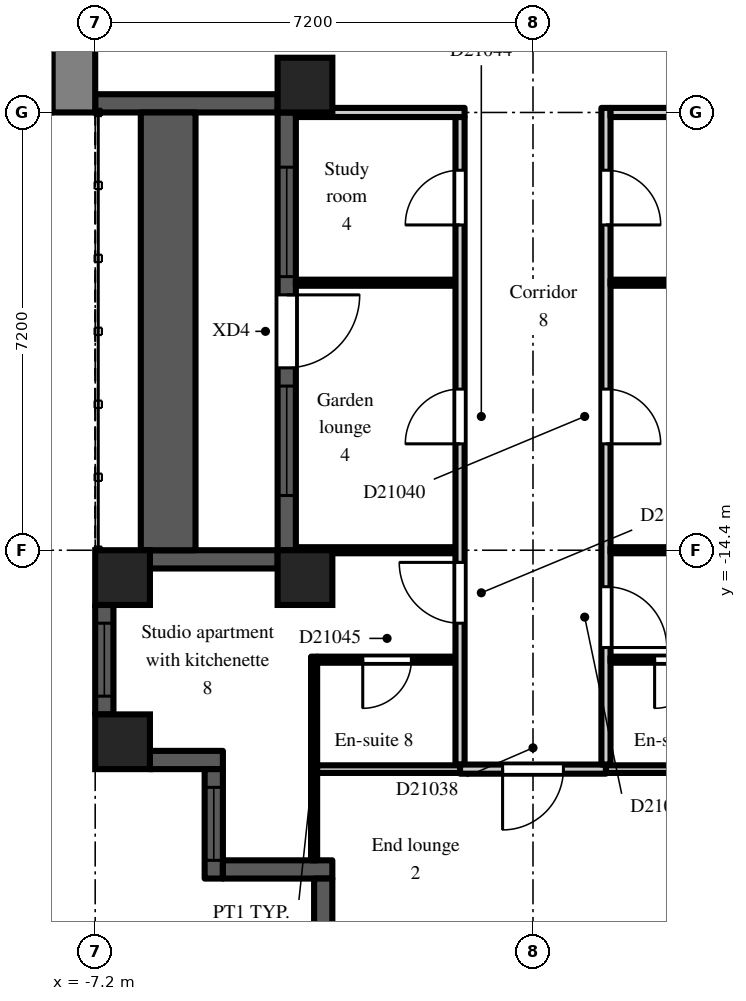
"""IFC4 building model, lengths in metres.
Left out: names, types, materials, properties, quantities, classifications, styles, units other than length and angle.
Written with IfcOpenShell. Run it as: python <this file> out.ifc"""

import sys

from ifc_helpers import new_model, si_unit, direction, frame, frame_2d, origin, origin_2d, place, context, subcontext, project, spatial, rectangle, extrude, element, fill, save


model = new_model("IFC4")
c1 = context("Model", 3, precision=1e-05, world=origin(), true_north=direction((0.0, 1.0)))
c2 = subcontext(c1, "Body", "Model", "MODEL_VIEW")
j1 = project(units=[si_unit("LENGTHUNIT", "METRE"), si_unit("PLANEANGLEUNIT", "RADIAN")], contexts=[c1])
p1 = place(None, origin())
s1 = spatial("IfcSite", under=j1, at=p1, CompositionType="ELEMENT")
p2 = place(p1, origin())
s2 = spatial("IfcBuilding", under=s1, at=p2, CompositionType="ELEMENT")
p3 = place(p2, frame((0.0, 0.0, 147.3)))
s3 = spatial("IfcBuildingStorey", under=s2, at=p3, CompositionType="ELEMENT", Elevation=147.3)
for number, where, z_axis, x_axis in (
    (1, (-6.75, -17.55, 0.0), (0.0, 0.0, 1.0), (1.0, 0.0, 0.0)),
    (2, (-6.75, -14.85, 0.0), (0.0, 0.0, 1.0), (1.0, 0.0, 0.0)),
    (3, (-3.75, -14.85, 0.0), (0.0, 0.0, 1.0), (1.0, 0.0, 0.0)),
    (4, (-3.75, -6.75, 0.0), (0.0, 0.0, 1.0), (1.0, 0.0, 0.0)),
):
    element("IfcColumn", number, at=place(p3, frame(where, z_axis=z_axis, x_axis=x_axis)), inside=s3, PredefinedType="COLUMN", context=c2, shape_type="SweptSolid", body=[
        extrude(rectangle(XDim=0.9, YDim=0.9, at=origin_2d()), origin(), (0.0, 0.0, 1.0), 3.0),
    ])
p4 = place(p3, frame((-7.2, -7.05, 0.0), z_axis=(0.0, 0.0, 1.0), x_axis=(1.0, 0.0, 0.0)))
e5 = element("IfcWall", 5, at=p4, inside=s3, PredefinedType="SOLIDWALL", context=c2, shape_type="SweptSolid", body=[
    extrude(rectangle(XDim=3.0, YDim=0.3, at=frame_2d((1.5, 0.0))), origin(), (0.0, 0.0, 1.0), 2.2),
])
p5 = place(p3, frame((-4.05, -7.2, 0.0), z_axis=(0.0, 0.0, 1.0), x_axis=(0.0, -1.0, 0.0)))
e6 = element("IfcWall", 6, at=p5, inside=s3, PredefinedType="SOLIDWALL", context=c2, shape_type="SweptSolid", body=[
    extrude(rectangle(XDim=7.2, YDim=0.3, at=frame_2d((3.6, 0.0))), origin(), (0.0, 0.0, 1.0), 2.2),
])
p6 = place(p5, frame((3.0, 0.0, 0.0)))
e7 = element("IfcOpeningElement", 7, at=p6, cuts=e6, PredefinedType="OPENING", context=c2, shape_type="SweptSolid", body=[
    extrude(rectangle(XDim=1.2, YDim=2.05, at=frame_2d((0.6, 1.025))), frame((0.0, 0.16, 0.0), z_axis=(0.0, -1.0, 0.0), x_axis=(1.0, 0.0, 0.0)), (0.0, 0.0, 1.0), 0.32),
])
p7 = place(p5, frame((0.9, 0.0, 0.2)))
e8 = element("IfcOpeningElement", 8, at=p7, cuts=e6, PredefinedType="OPENING", context=c2, shape_type="SweptSolid", body=[
    extrude(rectangle(XDim=1.8, YDim=1.85, at=frame_2d((0.9, 0.925))), frame((0.0, 0.16, 0.0), z_axis=(0.0, -1.0, 0.0), x_axis=(1.0, 0.0, 0.0)), (0.0, 0.0, 1.0), 0.32),
])
p8 = place(p5, frame((4.5, 0.0, 0.2)))
e9 = element("IfcOpeningElement", 9, at=p8, cuts=e6, PredefinedType="OPENING", context=c2, shape_type="SweptSolid", body=[
    extrude(rectangle(XDim=1.8, YDim=1.85, at=frame_2d((0.9, 0.925))), frame((0.0, 0.16, 0.0), z_axis=(0.0, -1.0, 0.0), x_axis=(1.0, 0.0, 0.0)), (0.0, 0.0, 1.0), 0.32),
])
p9 = place(p3, frame((-4.2, -14.55, 0.0), z_axis=(0.0, 0.0, 1.0), x_axis=(-1.0, 0.0, 0.0)))
e10 = element("IfcWall", 10, at=p9, inside=s3, PredefinedType="SOLIDWALL", context=c2, shape_type="SweptSolid", body=[
    extrude(rectangle(XDim=2.1, YDim=0.3, at=frame_2d((1.05, 0.0))), origin(), (0.0, 0.0, 1.0), 2.2),
])
p10 = place(p3, frame((-7.05, -15.3, 0.0), z_axis=(0.0, 0.0, 1.0), x_axis=(0.0, -1.0, 0.0)))
e11 = element("IfcWall", 11, at=p10, inside=s3, PredefinedType="SOLIDWALL", context=c2, shape_type="SweptSolid", body=[
    extrude(rectangle(XDim=1.8, YDim=0.3, at=frame_2d((0.9, 0.0))), origin(), (0.0, 0.0, 1.0), 2.2),
])
p11 = place(p10, frame((0.3, 0.0, 0.2)))
e12 = element("IfcOpeningElement", 12, at=p11, cuts=e11, PredefinedType="OPENING", context=c2, shape_type="SweptSolid", body=[
    extrude(rectangle(XDim=1.2, YDim=1.85, at=frame_2d((0.6, 0.925))), frame((0.0, 0.16, 0.0), z_axis=(0.0, -1.0, 0.0), x_axis=(1.0, 0.0, 0.0)), (0.0, 0.0, 1.0), 0.32),
])
p12 = place(p3, frame((-6.3, -17.85, 0.0), z_axis=(0.0, 0.0, 1.0), x_axis=(1.0, 0.0, 0.0)))
e13 = element("IfcWall", 13, at=p12, inside=s3, PredefinedType="SOLIDWALL", context=c2, shape_type="SweptSolid", body=[
    extrude(rectangle(XDim=1.2, YDim=0.3, at=frame_2d((0.6, 0.0))), origin(), (0.0, 0.0, 1.0), 2.6),
])
p13 = place(p3, frame((-5.25, -18.0, 0.0), z_axis=(0.0, 0.0, 1.0), x_axis=(0.0, -1.0, 0.0)))
e14 = element("IfcWall", 14, at=p13, inside=s3, PredefinedType="SOLIDWALL", context=c2, shape_type="SweptSolid", body=[
    extrude(rectangle(XDim=1.8, YDim=0.3, at=frame_2d((0.9, 0.0))), origin(), (0.0, 0.0, 1.0), 2.6),
])
p14 = place(p13, frame((0.3, 0.0, 0.2)))
e15 = element("IfcOpeningElement", 15, at=p14, cuts=e14, PredefinedType="OPENING", context=c2, shape_type="SweptSolid", body=[
    extrude(rectangle(XDim=1.2, YDim=1.85, at=frame_2d((0.6, 0.925))), frame((0.0, 0.16, 0.0), z_axis=(0.0, -1.0, 0.0), x_axis=(1.0, 0.0, 0.0)), (0.0, 0.0, 1.0), 0.32),
])
p15 = place(p3, frame((-5.1, -19.65, 0.0), z_axis=(0.0, 0.0, 1.0), x_axis=(1.0, 0.0, 0.0)))
e16 = element("IfcWall", 16, at=p15, inside=s3, PredefinedType="SOLIDWALL", context=c2, shape_type="SweptSolid", body=[
    extrude(rectangle(XDim=1.8, YDim=0.3, at=frame_2d((0.9, 0.0))), origin(), (0.0, 0.0, 1.0), 2.6),
])
p16 = place(p3, frame((-3.45, -19.8, 0.0), z_axis=(0.0, 0.0, 1.0), x_axis=(0.0, -1.0, 0.0)))
e17 = element("IfcWall", 17, at=p16, inside=s3, PredefinedType="SOLIDWALL", context=c2, shape_type="SweptSolid", body=[
    extrude(rectangle(XDim=0.9, YDim=0.3, at=frame_2d((0.45, 0.0))), origin(), (0.0, 0.0, 1.0), 2.6),
])
p17 = place(p3, frame((-6.0, -14.4, 0.0), z_axis=(0.0, 0.0, 1.0), x_axis=(0.0, 1.0, 0.0)))
e18 = element("IfcWall", 18, at=p17, inside=s3, PredefinedType="PARAPET", context=c2, shape_type="SweptSolid", body=[
    extrude(rectangle(XDim=7.2, YDim=0.9, at=frame_2d((3.6, 0.0))), origin(), (0.0, 0.0, 1.0), 0.8),
])
p18 = place(p3, frame((-7.55, -7.2, 0.0), z_axis=(0.0, 0.0, 1.0), x_axis=(0.0, 1.0, 0.0)))
e19 = element("IfcWall", 19, at=p18, inside=s3, PredefinedType="SHEAR", context=c2, shape_type="SweptSolid", body=[
    extrude(rectangle(XDim=14.4, YDim=0.7, at=frame_2d((7.2, 0.0))), origin(), (0.0, 0.0, 1.0), 2.6),
])
p19 = place(p18, frame((6.0, 0.0, 0.0)))
e20 = element("IfcOpeningElement", 20, at=p19, cuts=e19, PredefinedType="OPENING", context=c2, shape_type="SweptSolid", body=[
    extrude(rectangle(XDim=2.4, YDim=2.2, at=frame_2d((1.2, 1.1))), frame((0.0, 0.36, 0.0), z_axis=(0.0, -1.0, 0.0), x_axis=(1.0, 0.0, 0.0)), (0.0, 0.0, 1.0), 0.72),
])
for number, where, z_axis, x_axis in (
    (21, (-3.9, -14.4, 0.0), (0.0, 0.0, 1.0), (1.0, 0.0, 0.0)),
    (22, (-3.9, -10.0, 0.0), (0.0, 0.0, 1.0), (1.0, 0.0, 0.0)),
):
    element("IfcWall", number, at=place(p3, frame(where, z_axis=z_axis, x_axis=x_axis)), inside=s3, PredefinedType="PARTITIONING", context=c2, shape_type="SweptSolid", body=[
        extrude(rectangle(XDim=2.625, YDim=0.1, at=frame_2d((1.312, 0.0))), origin(), (0.0, 0.0, 1.0), 2.6),
    ])
p20 = place(p3, frame((-3.9, -7.2, 0.0), z_axis=(0.0, 0.0, 1.0), x_axis=(1.0, 0.0, 0.0)))
e23 = element("IfcWall", 23, at=p20, inside=s3, PredefinedType="PARTITIONING", context=c2, shape_type="SweptSolid", body=[
    extrude(rectangle(XDim=2.775, YDim=0.15, at=frame_2d((1.387, 0.0))), origin(), (0.0, 0.0, 1.0), 2.6),
])
p21 = place(p3, frame((-3.6, -19.5, 0.0), z_axis=(0.0, 0.0, 1.0), x_axis=(0.0, 1.0, 0.0)))
e24 = element("IfcWall", 24, at=p21, inside=s3, PredefinedType="PARTITIONING", context=c2, shape_type="SweptSolid", body=[
    extrude(rectangle(XDim=3.35, YDim=0.1, at=frame_2d((1.675, 0.0))), origin(), (0.0, 0.0, 1.0), 2.6),
])
p22 = place(p3, frame((-3.55, -18.0, 0.0), z_axis=(0.0, 0.0, 1.0), x_axis=(1.0, 0.0, 0.0)))
e25 = element("IfcWall", 25, at=p22, inside=s3, PredefinedType="PARTITIONING", context=c2, shape_type="SweptSolid", body=[
    extrude(rectangle(XDim=2.35, YDim=0.125, at=frame_2d((1.175, 0.0))), origin(), (0.0, 0.0, 1.0), 2.6),
])
p23 = place(p3, frame((-3.55, -16.2, 0.0), z_axis=(0.0, 0.0, 1.0), x_axis=(1.0, 0.0, 0.0)))
e26 = element("IfcWall", 26, at=p23, inside=s3, PredefinedType="PARTITIONING", context=c2, shape_type="SweptSolid", body=[
    extrude(rectangle(XDim=2.275, YDim=0.1, at=frame_2d((1.138, 0.0))), origin(), (0.0, 0.0, 1.0), 2.6),
])
p24 = place(p23, frame((0.75, 0.0, 0.0)))
e27 = element("IfcOpeningElement", 27, at=p24, cuts=e26, PredefinedType="OPENING", context=c2, shape_type="SweptSolid", body=[
    extrude(rectangle(XDim=0.8, YDim=2.1, at=frame_2d((0.4, 1.05))), frame((0.0, 0.06, 0.0), z_axis=(0.0, -1.0, 0.0), x_axis=(1.0, 0.0, 0.0)), (0.0, 0.0, 1.0), 0.12),
])
p25 = place(p3, frame((-1.2, -17.925, 0.0), z_axis=(0.0, 0.0, 1.0), x_axis=(0.0, 1.0, 0.0)))
e28 = element("IfcWall", 28, at=p25, inside=s3, PredefinedType="PARTITIONING", context=c2, shape_type="SweptSolid", body=[
    extrude(rectangle(XDim=10.65, YDim=0.15, at=frame_2d((5.325, 0.0))), origin(), (0.0, 0.0, 1.0), 2.6),
])
p26 = place(p25, frame((8.875, 0.0, 0.0)))
e29 = element("IfcOpeningElement", 29, at=p26, cuts=e28, PredefinedType="OPENING", context=c2, shape_type="SweptSolid", body=[
    extrude(rectangle(XDim=0.9, YDim=2.1, at=frame_2d((0.45, 1.05))), frame((0.0, 0.085, 0.0), z_axis=(0.0, -1.0, 0.0), x_axis=(1.0, 0.0, 0.0)), (0.0, 0.0, 1.0), 0.17),
])
p27 = place(p25, frame((5.275, 0.0, 0.0)))
e30 = element("IfcOpeningElement", 30, at=p27, cuts=e28, PredefinedType="OPENING", context=c2, shape_type="SweptSolid", body=[
    extrude(rectangle(XDim=0.9, YDim=2.1, at=frame_2d((0.45, 1.05))), frame((0.0, 0.085, 0.0), z_axis=(0.0, -1.0, 0.0), x_axis=(1.0, 0.0, 0.0)), (0.0, 0.0, 1.0), 0.17),
])
p28 = place(p25, frame((2.325, 0.0, 0.0)))
e31 = element("IfcOpeningElement", 31, at=p28, cuts=e28, PredefinedType="OPENING", context=c2, shape_type="SweptSolid", body=[
    extrude(rectangle(XDim=1.0, YDim=2.1, at=frame_2d((0.5, 1.05))), frame((0.0, 0.085, 0.0), z_axis=(0.0, -1.0, 0.0), x_axis=(1.0, 0.0, 0.0)), (0.0, 0.0, 1.0), 0.17),
])
p29 = place(p3, frame((-1.2, -18.0, 0.0), z_axis=(0.0, 0.0, 1.0), x_axis=(1.0, 0.0, 0.0)))
e32 = element("IfcWall", 32, at=p29, inside=s3, PredefinedType="PARTITIONING", context=c2, shape_type="SweptSolid", body=[
    extrude(rectangle(XDim=2.4, YDim=0.15, at=frame_2d((1.2, 0.0))), origin(), (0.0, 0.0, 1.0), 2.6),
])
p30 = place(p29, frame((0.7, 0.0, 0.0)))
e33 = element("IfcOpeningElement", 33, at=p30, cuts=e32, PredefinedType="OPENING", context=c2, shape_type="SweptSolid", body=[
    extrude(rectangle(XDim=1.0, YDim=2.1, at=frame_2d((0.5, 1.05))), frame((0.0, 0.085, 0.0), z_axis=(0.0, -1.0, 0.0), x_axis=(1.0, 0.0, 0.0)), (0.0, 0.0, 1.0), 0.17),
])
p31 = place(p3, frame((1.2, -17.925, 0.0), z_axis=(0.0, 0.0, 1.0), x_axis=(0.0, 1.0, 0.0)))
e34 = element("IfcWall", 34, at=p31, inside=s3, PredefinedType="PARTITIONING", context=c2, shape_type="SweptSolid", body=[
    extrude(rectangle(XDim=10.8, YDim=0.15, at=frame_2d((5.4, 0.0))), origin(), (0.0, 0.0, 1.0), 2.6),
])
p32 = place(p31, frame((8.875, 0.0, 0.0)))
e35 = element("IfcOpeningElement", 35, at=p32, cuts=e34, PredefinedType="OPENING", context=c2, shape_type="SweptSolid", body=[
    extrude(rectangle(XDim=0.9, YDim=2.1, at=frame_2d((0.45, 1.05))), frame((0.0, 0.085, 0.0), z_axis=(0.0, -1.0, 0.0), x_axis=(1.0, 0.0, 0.0)), (0.0, 0.0, 1.0), 0.17),
])
p33 = place(p31, frame((5.275, 0.0, 0.0)))
e36 = element("IfcOpeningElement", 36, at=p33, cuts=e34, PredefinedType="OPENING", context=c2, shape_type="SweptSolid", body=[
    extrude(rectangle(XDim=0.9, YDim=2.1, at=frame_2d((0.45, 1.05))), frame((0.0, 0.085, 0.0), z_axis=(0.0, -1.0, 0.0), x_axis=(1.0, 0.0, 0.0)), (0.0, 0.0, 1.0), 0.17),
])
p34 = place(p31, frame((1.925, 0.0, 0.0)))
e37 = element("IfcOpeningElement", 37, at=p34, cuts=e34, PredefinedType="OPENING", context=c2, shape_type="SweptSolid", body=[
    extrude(rectangle(XDim=1.0, YDim=2.1, at=frame_2d((0.5, 1.05))), frame((0.0, 0.085, 0.0), z_axis=(0.0, -1.0, 0.0), x_axis=(1.0, 0.0, 0.0)), (0.0, 0.0, 1.0), 0.17),
])
p35 = place(p3, frame((1.2, -18.0, 0.0), z_axis=(0.0, 0.0, 1.0), x_axis=(1.0, 0.0, 0.0)))
e38 = element("IfcWall", 38, at=p35, inside=s3, PredefinedType="PARTITIONING", context=c2, shape_type="SweptSolid", body=[
    extrude(rectangle(XDim=2.35, YDim=0.125, at=frame_2d((1.175, 0.0))), origin(), (0.0, 0.0, 1.0), 2.6),
])
p36 = place(p3, frame((1.275, -16.2, 0.0), z_axis=(0.0, 0.0, 1.0), x_axis=(1.0, 0.0, 0.0)))
e39 = element("IfcWall", 39, at=p36, inside=s3, PredefinedType="PARTITIONING", context=c2, shape_type="SweptSolid", body=[
    extrude(rectangle(XDim=2.375, YDim=0.1, at=frame_2d((1.188, 0.0))), origin(), (0.0, 0.0, 1.0), 2.6),
])
p37 = place(p36, frame((0.725, 0.0, 0.0)))
e40 = element("IfcOpeningElement", 40, at=p37, cuts=e39, PredefinedType="OPENING", context=c2, shape_type="SweptSolid", body=[
    extrude(rectangle(XDim=0.8, YDim=2.1, at=frame_2d((0.4, 1.05))), frame((0.0, 0.06, 0.0), z_axis=(0.0, -1.0, 0.0), x_axis=(1.0, 0.0, 0.0)), (0.0, 0.0, 1.0), 0.12),
])
for number, where, z_axis, x_axis in (
    (41, (1.275, -14.4, 0.0), (0.0, 0.0, 1.0), (1.0, 0.0, 0.0)),
    (42, (1.275, -10.0, 0.0), (0.0, 0.0, 1.0), (1.0, 0.0, 0.0)),
):
    element("IfcWall", number, at=place(p3, frame(where, z_axis=z_axis, x_axis=x_axis)), inside=s3, PredefinedType="PARTITIONING", context=c2, shape_type="SweptSolid", body=[
        extrude(rectangle(XDim=2.625, YDim=0.1, at=frame_2d((1.312, 0.0))), origin(), (0.0, 0.0, 1.0), 2.6),
    ])
p38 = place(p3, frame((1.275, -7.2, 0.0), z_axis=(0.0, 0.0, 1.0), x_axis=(1.0, 0.0, 0.0)))
e43 = element("IfcWall", 43, at=p38, inside=s3, PredefinedType="PARTITIONING", context=c2, shape_type="SweptSolid", body=[
    extrude(rectangle(XDim=2.625, YDim=0.15, at=frame_2d((1.312, 0.0))), origin(), (0.0, 0.0, 1.0), 2.6),
])
p39 = place(p6, origin())
e44 = element("IfcDoor", 44, at=p39, inside=s3, OperationType="SINGLE_SWING_LEFT", PredefinedType="DOOR", context=c2, shape_type="SweptSolid", body=[
    extrude(rectangle(XDim=1.2, YDim=2.05, at=frame_2d((0.6, 1.025))), frame((0.0, 0.025, 0.0), z_axis=(0.0, -1.0, 0.0), x_axis=(1.0, 0.0, 0.0)), (0.0, 0.0, 1.0), 0.05),
])
fill(e7, e44)
p40 = place(p7, origin())
e45 = element("IfcWindow", 45, at=p40, inside=s3, PartitioningType="SINGLE_PANEL", PredefinedType="WINDOW", context=c2, shape_type="SweptSolid", body=[
    extrude(rectangle(XDim=1.8, YDim=1.85, at=frame_2d((0.9, 0.925))), frame((0.0, 0.03, 0.0), z_axis=(0.0, -1.0, 0.0), x_axis=(1.0, 0.0, 0.0)), (0.0, 0.0, 1.0), 0.06),
])
fill(e8, e45)
p41 = place(p8, origin())
e46 = element("IfcWindow", 46, at=p41, inside=s3, PartitioningType="SINGLE_PANEL", PredefinedType="WINDOW", context=c2, shape_type="SweptSolid", body=[
    extrude(rectangle(XDim=1.8, YDim=1.85, at=frame_2d((0.9, 0.925))), frame((0.0, 0.03, 0.0), z_axis=(0.0, -1.0, 0.0), x_axis=(1.0, 0.0, 0.0)), (0.0, 0.0, 1.0), 0.06),
])
fill(e9, e46)
p42 = place(p11, origin())
e47 = element("IfcWindow", 47, at=p42, inside=s3, PartitioningType="SINGLE_PANEL", PredefinedType="WINDOW", context=c2, shape_type="SweptSolid", body=[
    extrude(rectangle(XDim=1.2, YDim=1.85, at=frame_2d((0.6, 0.925))), frame((0.0, 0.03, 0.0), z_axis=(0.0, -1.0, 0.0), x_axis=(1.0, 0.0, 0.0)), (0.0, 0.0, 1.0), 0.06),
])
fill(e12, e47)
p43 = place(p14, origin())
e48 = element("IfcWindow", 48, at=p43, inside=s3, PartitioningType="SINGLE_PANEL", PredefinedType="WINDOW", context=c2, shape_type="SweptSolid", body=[
    extrude(rectangle(XDim=1.2, YDim=1.85, at=frame_2d((0.6, 0.925))), frame((0.0, 0.03, 0.0), z_axis=(0.0, -1.0, 0.0), x_axis=(1.0, 0.0, 0.0)), (0.0, 0.0, 1.0), 0.06),
])
fill(e15, e48)
p44 = place(p30, frame((1.0, 0.0, 0.0), z_axis=(0.0, 0.0, 1.0), x_axis=(-1.0, 0.0, 0.0)))
e49 = element("IfcDoor", 49, at=p44, inside=s3, OperationType="SINGLE_SWING_RIGHT", PredefinedType="DOOR", context=c2, shape_type="SweptSolid", body=[
    extrude(rectangle(XDim=1.0, YDim=2.1, at=frame_2d((0.5, 1.05))), frame((0.0, 0.025, 0.0), z_axis=(0.0, -1.0, 0.0), x_axis=(1.0, 0.0, 0.0)), (0.0, 0.0, 1.0), 0.05),
])
fill(e33, e49)
p45 = place(p32, frame((0.9, 0.0, 0.0), z_axis=(0.0, 0.0, 1.0), x_axis=(-1.0, 0.0, 0.0)))
e50 = element("IfcDoor", 50, at=p45, inside=s3, OperationType="SINGLE_SWING_RIGHT", PredefinedType="DOOR", context=c2, shape_type="SweptSolid", body=[
    extrude(rectangle(XDim=0.9, YDim=2.1, at=frame_2d((0.45, 1.05))), frame((0.0, 0.025, 0.0), z_axis=(0.0, -1.0, 0.0), x_axis=(1.0, 0.0, 0.0)), (0.0, 0.0, 1.0), 0.05),
])
fill(e35, e50)
p46 = place(p33, frame((0.9, 0.0, 0.0), z_axis=(0.0, 0.0, 1.0), x_axis=(-1.0, 0.0, 0.0)))
e51 = element("IfcDoor", 51, at=p46, inside=s3, OperationType="SINGLE_SWING_RIGHT", PredefinedType="DOOR", context=c2, shape_type="SweptSolid", body=[
    extrude(rectangle(XDim=0.9, YDim=2.1, at=frame_2d((0.45, 1.05))), frame((0.0, 0.025, 0.0), z_axis=(0.0, -1.0, 0.0), x_axis=(1.0, 0.0, 0.0)), (0.0, 0.0, 1.0), 0.05),
])
fill(e36, e51)
p47 = place(p37, frame((0.8, 0.0, 0.0), z_axis=(0.0, 0.0, 1.0), x_axis=(-1.0, 0.0, 0.0)))
e52 = element("IfcDoor", 52, at=p47, inside=s3, OperationType="SINGLE_SWING_RIGHT", PredefinedType="DOOR", context=c2, shape_type="SweptSolid", body=[
    extrude(rectangle(XDim=0.8, YDim=2.1, at=frame_2d((0.4, 1.05))), frame((0.0, 0.025, 0.0), z_axis=(0.0, -1.0, 0.0), x_axis=(1.0, 0.0, 0.0)), (0.0, 0.0, 1.0), 0.05),
])
fill(e40, e52)
p48 = place(p34, frame((1.0, 0.0, 0.0), z_axis=(0.0, 0.0, 1.0), x_axis=(-1.0, 0.0, 0.0)))
e53 = element("IfcDoor", 53, at=p48, inside=s3, OperationType="SINGLE_SWING_RIGHT", PredefinedType="DOOR", context=c2, shape_type="SweptSolid", body=[
    extrude(rectangle(XDim=1.0, YDim=2.1, at=frame_2d((0.5, 1.05))), frame((0.0, 0.025, 0.0), z_axis=(0.0, -1.0, 0.0), x_axis=(1.0, 0.0, 0.0)), (0.0, 0.0, 1.0), 0.05),
])
fill(e37, e53)
p49 = place(p26, origin())
e54 = element("IfcDoor", 54, at=p49, inside=s3, OperationType="SINGLE_SWING_LEFT", PredefinedType="DOOR", context=c2, shape_type="SweptSolid", body=[
    extrude(rectangle(XDim=0.9, YDim=2.1, at=frame_2d((0.45, 1.05))), frame((0.0, 0.025, 0.0), z_axis=(0.0, -1.0, 0.0), x_axis=(1.0, 0.0, 0.0)), (0.0, 0.0, 1.0), 0.05),
])
fill(e29, e54)
p50 = place(p27, origin())
e55 = element("IfcDoor", 55, at=p50, inside=s3, OperationType="SINGLE_SWING_LEFT", PredefinedType="DOOR", context=c2, shape_type="SweptSolid", body=[
    extrude(rectangle(XDim=0.9, YDim=2.1, at=frame_2d((0.45, 1.05))), frame((0.0, 0.025, 0.0), z_axis=(0.0, -1.0, 0.0), x_axis=(1.0, 0.0, 0.0)), (0.0, 0.0, 1.0), 0.05),
])
fill(e30, e55)
p51 = place(p24, frame((0.8, 0.0, 0.0), z_axis=(0.0, 0.0, 1.0), x_axis=(-1.0, 0.0, 0.0)))
e56 = element("IfcDoor", 56, at=p51, inside=s3, OperationType="SINGLE_SWING_RIGHT", PredefinedType="DOOR", context=c2, shape_type="SweptSolid", body=[
    extrude(rectangle(XDim=0.8, YDim=2.1, at=frame_2d((0.4, 1.05))), frame((0.0, 0.025, 0.0), z_axis=(0.0, -1.0, 0.0), x_axis=(1.0, 0.0, 0.0)), (0.0, 0.0, 1.0), 0.05),
])
fill(e27, e56)
p52 = place(p28, origin())
e57 = element("IfcDoor", 57, at=p52, inside=s3, OperationType="SINGLE_SWING_RIGHT", PredefinedType="DOOR", context=c2, shape_type="SweptSolid", body=[
    extrude(rectangle(XDim=1.0, YDim=2.1, at=frame_2d((0.5, 1.05))), frame((0.0, 0.025, 0.0), z_axis=(0.0, -1.0, 0.0), x_axis=(1.0, 0.0, 0.0)), (0.0, 0.0, 1.0), 0.05),
])
fill(e31, e57)
save(model, sys.argv[1])
